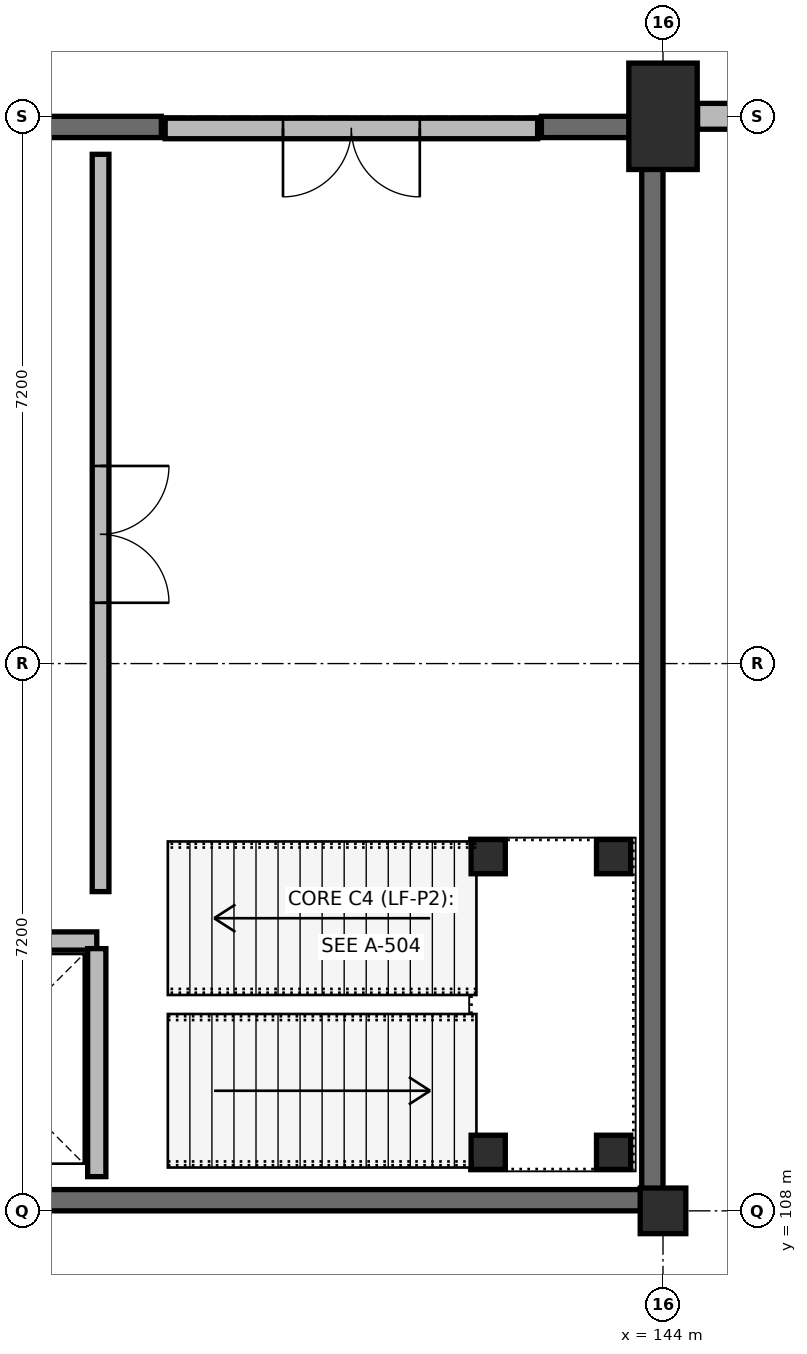
"""IFC4 building model, lengths in metres.
Left out: names, types, materials, properties, quantities, classifications, styles, units other than length and angle.
Written with IfcOpenShell. Run it as: python <this file> out.ifc"""

import sys

from ifc_helpers import new_model, si_unit, direction, frame, frame_2d, origin, origin_2d, place, context, subcontext, project, spatial, rectangle, extrude, element, fill, save


model = new_model("IFC4")
c1 = context("Model", 3, precision=1e-05, world=origin(), true_north=direction((0.0, 1.0)))
c2 = subcontext(c1, "Body", "Model", "MODEL_VIEW")
j1 = project(units=[si_unit("LENGTHUNIT", "METRE"), si_unit("PLANEANGLEUNIT", "RADIAN")], contexts=[c1])
p1 = place(None, origin())
s1 = spatial("IfcSite", under=j1, at=p1, CompositionType="ELEMENT")
p2 = place(p1, origin())
s2 = spatial("IfcBuilding", under=s1, at=p2, CompositionType="ELEMENT")
p3 = place(p2, origin())
s3 = spatial("IfcBuildingStorey", under=s2, at=p3, CompositionType="ELEMENT", Elevation=0.0)
p4 = place(p3, frame((144.0, 122.4, 0.0), z_axis=(0.0, 0.0, 1.0), x_axis=(1.0, 0.0, 0.0)))
e1 = element("IfcColumn", 1, at=p4, inside=s3, PredefinedType="COLUMN", context=c2, shape_type="SweptSolid", body=[
    extrude(rectangle(XDim=0.9, YDim=1.4, at=origin_2d()), origin(), (0.0, 0.0, 1.0), 4.8),
])
p5 = place(p3, frame((144.0, 108.0, 0.0), z_axis=(0.0, 0.0, 1.0), x_axis=(1.0, 0.0, 0.0)))
e2 = element("IfcColumn", 2, at=p5, inside=s3, PredefinedType="COLUMN", context=c2, shape_type="SweptSolid", body=[
    extrude(rectangle(XDim=0.6, YDim=0.6, at=origin_2d()), origin(), (0.0, 0.0, 1.0), 4.8),
])
p6 = place(p3, frame((133.2, 108.14, 0.0), z_axis=(0.0, 0.0, 1.0), x_axis=(1.0, 0.0, 0.0)))
e3 = element("IfcWall", 3, at=p6, inside=s3, PredefinedType="SHEAR", context=c2, shape_type="SweptSolid", body=[
    extrude(rectangle(XDim=10.8, YDim=0.28, at=frame_2d((5.4, 0.0))), origin(), (0.0, 0.0, 1.0), 4.8),
])
p7 = place(p3, frame((133.2, 122.26, 0.0), z_axis=(0.0, 0.0, 1.0), x_axis=(1.0, 0.0, 0.0)))
e4 = element("IfcWall", 4, at=p7, inside=s3, PredefinedType="SHEAR", context=c2, shape_type="SweptSolid", body=[
    extrude(rectangle(XDim=4.2, YDim=0.28, at=frame_2d((2.1, 0.0))), origin(), (0.0, 0.0, 1.0), 4.8),
])
p8 = place(p3, frame((142.4, 122.26, 0.0), z_axis=(0.0, 0.0, 1.0), x_axis=(1.0, 0.0, 0.0)))
e5 = element("IfcWall", 5, at=p8, inside=s3, PredefinedType="SHEAR", context=c2, shape_type="SweptSolid", body=[
    extrude(rectangle(XDim=1.6, YDim=0.28, at=frame_2d((0.8, 0.0))), origin(), (0.0, 0.0, 1.0), 4.8),
])
p9 = place(p3, frame((143.86, 108.28, 0.0), z_axis=(0.0, 0.0, 1.0), x_axis=(0.0, 1.0, 0.0)))
e6 = element("IfcWall", 6, at=p9, inside=s3, PredefinedType="SHEAR", context=c2, shape_type="SweptSolid", body=[
    extrude(rectangle(XDim=13.84, YDim=0.28, at=frame_2d((6.92, 0.0))), origin(), (0.0, 0.0, 1.0), 4.8),
])
p10 = place(p3, frame((144.455, 122.4, 0.0), z_axis=(0.0, 0.0, 1.0), x_axis=(1.0, 0.0, 0.0)))
e7 = element("IfcWall", 7, at=p10, inside=s3, PredefinedType="SOLIDWALL", context=c2, shape_type="SweptSolid", body=[
    extrude(rectangle(XDim=9.89, YDim=0.34, at=frame_2d((4.945, 0.0))), origin(), (0.0, 0.0, 1.0), 3.655),
])
p11 = place(p10, frame((3.345, 0.0, 0.0)))
e8 = element("IfcOpeningElement", 8, at=p11, cuts=e7, PredefinedType="OPENING", context=c2, shape_type="SweptSolid", body=[
    extrude(rectangle(XDim=3.2, YDim=2.6, at=frame_2d((1.6, 1.3))), frame((0.0, 0.18, 0.0), z_axis=(0.0, -1.0, 0.0), x_axis=(1.0, 0.0, 0.0)), (0.0, 0.0, 1.0), 0.36),
])
p12 = place(p3, frame((137.45, 122.24, 0.0), z_axis=(0.0, 0.0, 1.0), x_axis=(1.0, 0.0, 0.0)))
e9 = element("IfcWall", 9, at=p12, inside=s3, PredefinedType="SOLIDWALL", context=c2, shape_type="SweptSolid", body=[
    extrude(rectangle(XDim=4.9, YDim=0.27, at=frame_2d((2.45, 0.0))), origin(), (0.0, 0.0, 1.0), 3.655),
])
p13 = place(p12, frame((1.55, 0.0, 0.0)))
e10 = element("IfcOpeningElement", 10, at=p13, cuts=e9, PredefinedType="OPENING", context=c2, shape_type="SweptSolid", body=[
    extrude(rectangle(XDim=1.8, YDim=2.3, at=frame_2d((0.9, 1.15))), frame((0.0, 0.145, 0.0), z_axis=(0.0, -1.0, 0.0), x_axis=(1.0, 0.0, 0.0)), (0.0, 0.0, 1.0), 0.29),
])
p14 = place(p3, frame((136.6, 112.2, 0.0), z_axis=(0.0, 0.0, 1.0), x_axis=(0.0, 1.0, 0.0)))
e11 = element("IfcWall", 11, at=p14, inside=s3, PredefinedType="PARTITIONING", context=c2, shape_type="SweptSolid", body=[
    extrude(rectangle(XDim=9.7, YDim=0.22, at=frame_2d((4.85, 0.0))), origin(), (0.0, 0.0, 1.0), 4.505),
])
p15 = place(p14, frame((3.8, 0.0, 0.0)))
e12 = element("IfcOpeningElement", 12, at=p15, cuts=e11, PredefinedType="OPENING", context=c2, shape_type="SweptSolid", body=[
    extrude(rectangle(XDim=1.8, YDim=2.2, at=frame_2d((0.9, 1.1))), frame((0.0, 0.12, 0.0), z_axis=(0.0, -1.0, 0.0), x_axis=(1.0, 0.0, 0.0)), (0.0, 0.0, 1.0), 0.24),
])
p16 = place(p3, frame((133.53, 111.55, 0.0), z_axis=(0.0, 0.0, 1.0), x_axis=(1.0, 0.0, 0.0)))
e13 = element("IfcWall", 13, at=p16, inside=s3, PredefinedType="SOLIDWALL", context=c2, shape_type="SweptSolid", body=[
    extrude(rectangle(XDim=3.02, YDim=0.24, at=frame_2d((1.51, 0.0))), origin(), (0.0, 0.0, 1.0), 3.755),
])
p17 = place(p16, frame((0.96, 0.0, 0.0)))
e14 = element("IfcOpeningElement", 14, at=p17, cuts=e13, PredefinedType="OPENING", context=c2, shape_type="SweptSolid", body=[
    extrude(rectangle(XDim=1.1, YDim=2.15, at=frame_2d((0.55, 1.075))), frame((0.0, 0.13, 0.0), z_axis=(0.0, -1.0, 0.0), x_axis=(1.0, 0.0, 0.0)), (0.0, 0.0, 1.0), 0.26),
])
p18 = place(p3, frame((136.55, 108.45, 0.0), z_axis=(0.0, 0.0, 1.0), x_axis=(0.0, 1.0, 0.0)))
e15 = element("IfcWall", 15, at=p18, inside=s3, PredefinedType="SOLIDWALL", context=c2, shape_type="SweptSolid", body=[
    extrude(rectangle(XDim=3.0, YDim=0.24, at=frame_2d((1.5, 0.0))), origin(), (0.0, 0.0, 1.0), 4.505),
])
for number, where, z_axis, x_axis in (
    (16, (143.35, 108.77, 0.0), (0.0, 0.0, 1.0), (1.0, 0.0, 0.0)),
    (17, (141.7, 108.77, 0.0), (0.0, 0.0, 1.0), (1.0, 0.0, 0.0)),
    (18, (143.35, 112.66, 0.0), (0.0, 0.0, 1.0), (1.0, 0.0, 0.0)),
    (19, (141.7, 112.66, 0.0), (0.0, 0.0, 1.0), (1.0, 0.0, 0.0)),
):
    element("IfcColumn", number, at=place(p3, frame(where, z_axis=z_axis, x_axis=x_axis)), inside=s3, PredefinedType="COLUMN", context=c2, shape_type="SweptSolid", body=[
        extrude(rectangle(XDim=0.45, YDim=0.45, at=origin_2d()), origin(), (0.0, 0.0, 1.0), 4.8),
    ])
p19 = place(p13, origin())
e20 = element("IfcDoor", 20, at=p19, inside=s3, OperationType="DOUBLE_DOOR_SINGLE_SWING", PredefinedType="DOOR", context=c2, shape_type="SweptSolid", body=[
    extrude(rectangle(XDim=1.8, YDim=2.3, at=frame_2d((0.9, 1.15))), frame((0.0, 0.025, 0.0), z_axis=(0.0, -1.0, 0.0), x_axis=(1.0, 0.0, 0.0)), (0.0, 0.0, 1.0), 0.05),
])
fill(e10, e20)
p20 = place(p15, origin())
e21 = element("IfcDoor", 21, at=p20, inside=s3, OperationType="DOUBLE_DOOR_SINGLE_SWING", PredefinedType="DOOR", context=c2, shape_type="SweptSolid", body=[
    extrude(rectangle(XDim=1.8, YDim=2.2, at=frame_2d((0.9, 1.1))), frame((0.0, 0.025, 0.0), z_axis=(0.0, -1.0, 0.0), x_axis=(1.0, 0.0, 0.0)), (0.0, 0.0, 1.0), 0.05),
])
fill(e12, e21)
save(model, sys.argv[1])
